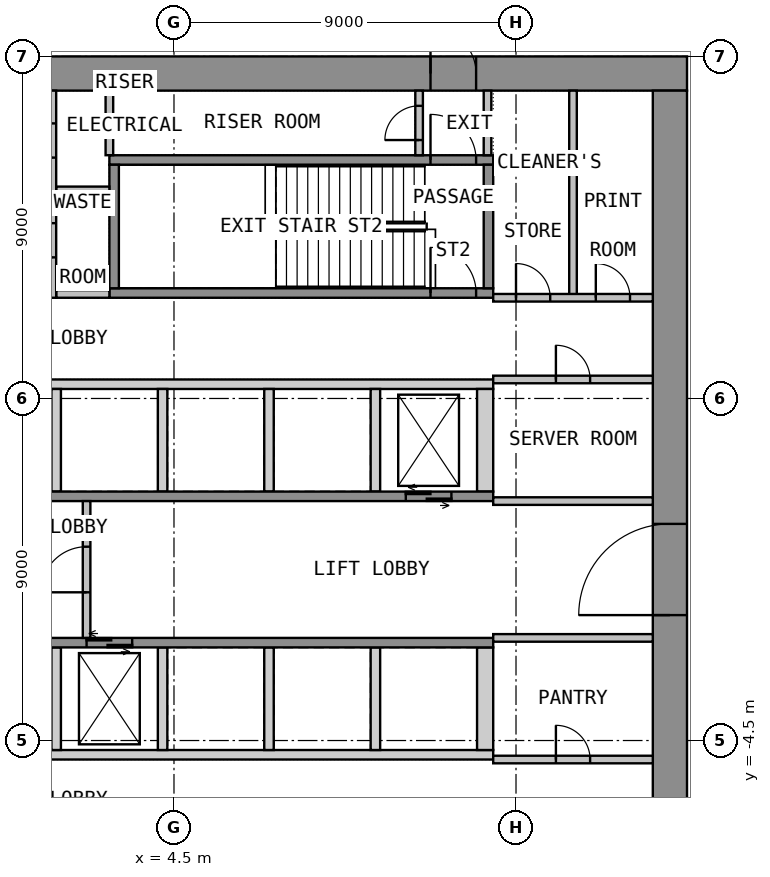
"""IFC4 building model, lengths in metres.
Left out: names, types, materials, properties, quantities, classifications, styles, units other than length and angle.
Written with IfcOpenShell. Run it as: python <this file> out.ifc"""

import sys

from ifc_helpers import new_model, si_unit, direction, frame, frame_2d, origin, place, context, subcontext, project, spatial, polyline, rectangle, outline, extrude, element, fill, save


model = new_model("IFC4")
c1 = context("Model", 3, precision=1e-05, world=origin(), true_north=direction((0.0, 1.0)))
c2 = subcontext(c1, "Body", "Model", "MODEL_VIEW")
j1 = project(units=[si_unit("LENGTHUNIT", "METRE"), si_unit("PLANEANGLEUNIT", "RADIAN")], contexts=[c1])
p1 = place(None, origin())
s1 = spatial("IfcSite", under=j1, at=p1, CompositionType="ELEMENT")
p2 = place(p1, origin())
s2 = spatial("IfcBuilding", under=s1, at=p2, CompositionType="ELEMENT")
p3 = place(p2, frame((0.0, 0.0, -5.0)))
s3 = spatial("IfcBuildingStorey", under=s2, at=p3, CompositionType="ELEMENT", Elevation=-5.0)
p4 = place(p3, frame((-18.0, 13.05, 0.0), z_axis=(0.0, 0.0, 1.0), x_axis=(1.0, 0.0, 0.0)))
e1 = element("IfcWall", 1, at=p4, inside=s3, PredefinedType="SHEAR", context=c2, shape_type="SweptSolid", body=[
    extrude(rectangle(XDim=36.0, YDim=0.9, at=frame_2d((18.0, 0.0))), origin(), (0.0, 0.0, 1.0), 4.55),
])
p5 = place(p4, frame((16.8, 0.0, 0.0)))
e2 = element("IfcOpeningElement", 2, at=p5, cuts=e1, PredefinedType="OPENING", context=c2, shape_type="SweptSolid", body=[
    extrude(rectangle(XDim=2.4, YDim=2.1, at=frame_2d((1.2, 1.05))), frame((0.0, 0.46, 0.0), z_axis=(0.0, -1.0, 0.0), x_axis=(1.0, 0.0, 0.0)), (0.0, 0.0, 1.0), 0.92),
])
p6 = place(p4, frame((5.55, 0.0, 0.0)))
e3 = element("IfcOpeningElement", 3, at=p6, cuts=e1, PredefinedType="OPENING", context=c2, shape_type="SweptSolid", body=[
    extrude(rectangle(XDim=1.2, YDim=2.1, at=frame_2d((0.6, 1.05))), frame((0.0, 0.46, 0.0), z_axis=(0.0, -1.0, 0.0), x_axis=(1.0, 0.0, 0.0)), (0.0, 0.0, 1.0), 0.92),
])
p7 = place(p4, frame((29.25, 0.0, 0.0)))
e4 = element("IfcOpeningElement", 4, at=p7, cuts=e1, PredefinedType="OPENING", context=c2, shape_type="SweptSolid", body=[
    extrude(rectangle(XDim=1.2, YDim=2.1, at=frame_2d((0.6, 1.05))), frame((0.0, 0.46, 0.0), z_axis=(0.0, -1.0, 0.0), x_axis=(1.0, 0.0, 0.0)), (0.0, 0.0, 1.0), 0.92),
])
p8 = place(p3, frame((17.55, -12.6, 0.0), z_axis=(0.0, 0.0, 1.0), x_axis=(0.0, 1.0, 0.0)))
e5 = element("IfcWall", 5, at=p8, inside=s3, PredefinedType="SHEAR", context=c2, shape_type="SweptSolid", body=[
    extrude(rectangle(XDim=25.2, YDim=0.9, at=frame_2d((12.6, 0.0))), origin(), (0.0, 0.0, 1.0), 4.55),
])
p9 = place(p8, frame((11.4, 0.0, 0.0)))
e6 = element("IfcOpeningElement", 6, at=p9, cuts=e5, PredefinedType="OPENING", context=c2, shape_type="SweptSolid", body=[
    extrude(rectangle(XDim=2.4, YDim=2.1, at=frame_2d((1.2, 1.05))), frame((0.0, 0.46, 0.0), z_axis=(0.0, -1.0, 0.0), x_axis=(1.0, 0.0, 0.0)), (0.0, 0.0, 1.0), 0.92),
])
p10 = place(p3, origin())
e7 = element("IfcWall", 7, at=p10, inside=s3, PredefinedType="SHEAR", context=c2, shape_type="SweptSolid", body=[
    extrude(outline(polyline([(-12.9, 4.75), (12.9, 4.75), (12.9, 5.0), (-12.9, 5.0), (-12.9, 4.75)])), origin(), (0.0, 0.0, 1.0), 4.55),
])
p11 = place(p3, origin())
e8 = element("IfcWall", 8, at=p11, inside=s3, PredefinedType="SHEAR", context=c2, shape_type="SweptSolid", body=[
    extrude(outline(polyline([(1.275, 2.05), (1.525, 2.05), (1.525, 4.75), (1.275, 4.75), (1.275, 2.05)])), origin(), (0.0, 0.0, 1.0), 4.55),
])
p12 = place(p3, origin())
e9 = element("IfcWall", 9, at=p12, inside=s3, PredefinedType="SHEAR", context=c2, shape_type="SweptSolid", body=[
    extrude(outline(polyline([(4.075, 2.05), (4.325, 2.05), (4.325, 4.75), (4.075, 4.75), (4.075, 2.05)])), origin(), (0.0, 0.0, 1.0), 4.55),
])
p13 = place(p3, origin())
e10 = element("IfcWall", 10, at=p13, inside=s3, PredefinedType="SHEAR", context=c2, shape_type="SweptSolid", body=[
    extrude(outline(polyline([(6.875, 2.05), (7.125, 2.05), (7.125, 4.75), (6.875, 4.75), (6.875, 2.05)])), origin(), (0.0, 0.0, 1.0), 4.55),
])
p14 = place(p3, origin())
e11 = element("IfcWall", 11, at=p14, inside=s3, PredefinedType="SHEAR", context=c2, shape_type="SweptSolid", body=[
    extrude(outline(polyline([(9.675, 2.05), (9.925, 2.05), (9.925, 4.75), (9.675, 4.75), (9.675, 2.05)])), origin(), (0.0, 0.0, 1.0), 4.55),
])
p15 = place(p3, origin())
e12 = element("IfcWall", 12, at=p15, inside=s3, PredefinedType="SHEAR", context=c2, shape_type="SweptSolid", body=[
    extrude(outline(polyline([(12.475, 2.05), (12.9, 2.05), (12.9, 4.75), (12.475, 4.75), (12.475, 2.05)])), origin(), (0.0, 0.0, 1.0), 4.55),
])
p16 = place(p3, frame((-12.9, 1.925, 0.0), z_axis=(0.0, 0.0, 1.0), x_axis=(1.0, 0.0, 0.0)))
e13 = element("IfcWall", 13, at=p16, inside=s3, PredefinedType="SHEAR", context=c2, shape_type="SweptSolid", body=[
    extrude(rectangle(XDim=25.8, YDim=0.25, at=frame_2d((12.9, 0.0))), origin(), (0.0, 0.0, 1.0), 4.55),
])
p17 = place(p16, frame((12.3, 0.0, 0.0)))
e14 = element("IfcOpeningElement", 14, at=p17, cuts=e13, PredefinedType="OPENING", context=c2, shape_type="SweptSolid", body=[
    extrude(rectangle(XDim=1.2, YDim=2.1, at=frame_2d((0.6, 1.05))), frame((0.0, 0.135, 0.0), z_axis=(0.0, -1.0, 0.0), x_axis=(1.0, 0.0, 0.0)), (0.0, 0.0, 1.0), 0.27),
])
p18 = place(p16, frame((23.5, 0.0, 0.0)))
e15 = element("IfcOpeningElement", 15, at=p18, cuts=e13, PredefinedType="OPENING", context=c2, shape_type="SweptSolid", body=[
    extrude(rectangle(XDim=1.2, YDim=2.1, at=frame_2d((0.6, 1.05))), frame((0.0, 0.135, 0.0), z_axis=(0.0, -1.0, 0.0), x_axis=(1.0, 0.0, 0.0)), (0.0, 0.0, 1.0), 0.27),
])
p19 = place(p3, origin())
e16 = element("IfcWall", 16, at=p19, inside=s3, PredefinedType="SHEAR", context=c2, shape_type="SweptSolid", body=[
    extrude(outline(polyline([(-12.9, -5.0), (12.9, -5.0), (12.9, -4.75), (-12.9, -4.75), (-12.9, -5.0)])), origin(), (0.0, 0.0, 1.0), 4.55),
])
p20 = place(p3, origin())
e17 = element("IfcWall", 17, at=p20, inside=s3, PredefinedType="SHEAR", context=c2, shape_type="SweptSolid", body=[
    extrude(outline(polyline([(1.275, -4.75), (1.525, -4.75), (1.525, -2.05), (1.275, -2.05), (1.275, -4.75)])), origin(), (0.0, 0.0, 1.0), 4.55),
])
p21 = place(p3, origin())
e18 = element("IfcWall", 18, at=p21, inside=s3, PredefinedType="SHEAR", context=c2, shape_type="SweptSolid", body=[
    extrude(outline(polyline([(4.075, -4.75), (4.325, -4.75), (4.325, -2.05), (4.075, -2.05), (4.075, -4.75)])), origin(), (0.0, 0.0, 1.0), 4.55),
])
p22 = place(p3, origin())
e19 = element("IfcWall", 19, at=p22, inside=s3, PredefinedType="SHEAR", context=c2, shape_type="SweptSolid", body=[
    extrude(outline(polyline([(6.875, -4.75), (7.125, -4.75), (7.125, -2.05), (6.875, -2.05), (6.875, -4.75)])), origin(), (0.0, 0.0, 1.0), 4.55),
])
p23 = place(p3, origin())
e20 = element("IfcWall", 20, at=p23, inside=s3, PredefinedType="SHEAR", context=c2, shape_type="SweptSolid", body=[
    extrude(outline(polyline([(9.675, -4.75), (9.925, -4.75), (9.925, -2.05), (9.675, -2.05), (9.675, -4.75)])), origin(), (0.0, 0.0, 1.0), 4.55),
])
p24 = place(p3, origin())
e21 = element("IfcWall", 21, at=p24, inside=s3, PredefinedType="SHEAR", context=c2, shape_type="SweptSolid", body=[
    extrude(outline(polyline([(12.475, -4.75), (12.9, -4.75), (12.9, -2.05), (12.475, -2.05), (12.475, -4.75)])), origin(), (0.0, 0.0, 1.0), 4.55),
])
p25 = place(p3, frame((-12.9, -1.925, 0.0), z_axis=(0.0, 0.0, 1.0), x_axis=(1.0, 0.0, 0.0)))
e22 = element("IfcWall", 22, at=p25, inside=s3, PredefinedType="SHEAR", context=c2, shape_type="SweptSolid", body=[
    extrude(rectangle(XDim=25.8, YDim=0.25, at=frame_2d((12.9, 0.0))), origin(), (0.0, 0.0, 1.0), 4.55),
])
p26 = place(p25, frame((12.3, 0.0, 0.0)))
e23 = element("IfcOpeningElement", 23, at=p26, cuts=e22, PredefinedType="OPENING", context=c2, shape_type="SweptSolid", body=[
    extrude(rectangle(XDim=1.2, YDim=2.1, at=frame_2d((0.6, 1.05))), frame((0.0, 0.135, 0.0), z_axis=(0.0, -1.0, 0.0), x_axis=(1.0, 0.0, 0.0)), (0.0, 0.0, 1.0), 0.27),
])
p27 = place(p25, frame((15.1, 0.0, 0.0)))
e24 = element("IfcOpeningElement", 24, at=p27, cuts=e22, PredefinedType="OPENING", context=c2, shape_type="SweptSolid", body=[
    extrude(rectangle(XDim=1.2, YDim=2.1, at=frame_2d((0.6, 1.05))), frame((0.0, 0.135, 0.0), z_axis=(0.0, -1.0, 0.0), x_axis=(1.0, 0.0, 0.0)), (0.0, 0.0, 1.0), 0.27),
])
p28 = place(p3, frame((2.2, -1.8, 0.0), z_axis=(0.0, 0.0, 1.0), x_axis=(0.0, 1.0, 0.0)))
e25 = element("IfcWall", 25, at=p28, inside=s3, PredefinedType="PARTITIONING", context=c2, shape_type="SweptSolid", body=[
    extrude(rectangle(XDim=3.6, YDim=0.2, at=frame_2d((1.8, 0.0))), origin(), (0.0, 0.0, 1.0), 4.55),
])
p29 = place(p28, frame((1.2, 0.0, 0.0)))
e26 = element("IfcOpeningElement", 26, at=p29, cuts=e25, PredefinedType="OPENING", context=c2, shape_type="SweptSolid", body=[
    extrude(rectangle(XDim=1.2, YDim=2.1, at=frame_2d((0.6, 1.05))), frame((0.0, 0.11, 0.0), z_axis=(0.0, -1.0, 0.0), x_axis=(1.0, 0.0, 0.0)), (0.0, 0.0, 1.0), 0.22),
])
p30 = place(p3, frame((2.8, 7.275, 0.0), z_axis=(0.0, 0.0, 1.0), x_axis=(1.0, 0.0, 0.0)))
e27 = element("IfcWall", 27, at=p30, inside=s3, PredefinedType="SHEAR", context=c2, shape_type="SweptSolid", body=[
    extrude(rectangle(XDim=10.1, YDim=0.25, at=frame_2d((5.05, 0.0))), origin(), (0.0, 0.0, 1.0), 4.55),
])
p31 = place(p30, frame((8.45, 0.0, 0.0)))
e28 = element("IfcOpeningElement", 28, at=p31, cuts=e27, PredefinedType="OPENING", context=c2, shape_type="SweptSolid", body=[
    extrude(rectangle(XDim=1.2, YDim=2.1, at=frame_2d((0.6, 1.05))), frame((0.0, 0.135, 0.0), z_axis=(0.0, -1.0, 0.0), x_axis=(1.0, 0.0, 0.0)), (0.0, 0.0, 1.0), 0.27),
])
p32 = place(p3, frame((2.8, 10.775, 0.0), z_axis=(0.0, 0.0, 1.0), x_axis=(1.0, 0.0, 0.0)))
e29 = element("IfcWall", 29, at=p32, inside=s3, PredefinedType="SHEAR", context=c2, shape_type="SweptSolid", body=[
    extrude(rectangle(XDim=10.1, YDim=0.25, at=frame_2d((5.05, 0.0))), origin(), (0.0, 0.0, 1.0), 4.55),
])
p33 = place(p32, frame((8.45, 0.0, 0.0)))
e30 = element("IfcOpeningElement", 30, at=p33, cuts=e29, PredefinedType="OPENING", context=c2, shape_type="SweptSolid", body=[
    extrude(rectangle(XDim=1.2, YDim=2.1, at=frame_2d((0.6, 1.05))), frame((0.0, 0.135, 0.0), z_axis=(0.0, -1.0, 0.0), x_axis=(1.0, 0.0, 0.0)), (0.0, 0.0, 1.0), 0.27),
])
for number, where, z_axis, x_axis in (
    (31, (2.925, 7.4, 0.0), (0.0, 0.0, 1.0), (0.0, 1.0, 0.0)),
    (32, (12.775, 7.4, 0.0), (0.0, 0.0, 1.0), (0.0, 1.0, 0.0)),
):
    element("IfcWall", number, at=place(p3, frame(where, z_axis=z_axis, x_axis=x_axis)), inside=s3, PredefinedType="SHEAR", context=c2, shape_type="SweptSolid", body=[
        extrude(rectangle(XDim=3.25, YDim=0.25, at=frame_2d((1.625, 0.0))), origin(), (0.0, 0.0, 1.0), 4.55),
    ])
for number, where, z_axis, x_axis in (
    (33, (1.4, 7.25, 0.0), (0.0, 0.0, 1.0), (1.0, 0.0, 0.0)),
    (34, (1.4, 9.975, 0.0), (0.0, 0.0, 1.0), (1.0, 0.0, 0.0)),
):
    element("IfcWall", number, at=place(p3, frame(where, z_axis=z_axis, x_axis=x_axis)), inside=s3, PredefinedType="PARTITIONING", context=c2, shape_type="SweptSolid", body=[
        extrude(rectangle(XDim=1.4, YDim=0.2, at=frame_2d((0.7, 0.0))), origin(), (0.0, 0.0, 1.0), 4.55),
    ])
p34 = place(p3, frame((1.3, 7.15, 0.0), z_axis=(0.0, 0.0, 1.0), x_axis=(0.0, 1.0, 0.0)))
e35 = element("IfcWall", 35, at=p34, inside=s3, PredefinedType="PARTITIONING", context=c2, shape_type="SweptSolid", body=[
    extrude(rectangle(XDim=5.45, YDim=0.2, at=frame_2d((2.725, 0.0))), origin(), (0.0, 0.0, 1.0), 4.55),
])
p35 = place(p34, frame((1.062, 0.0, 0.0)))
e36 = element("IfcOpeningElement", 36, at=p35, cuts=e35, PredefinedType="OPENING", context=c2, shape_type="SweptSolid", body=[
    extrude(rectangle(XDim=0.9, YDim=2.1, at=frame_2d((0.45, 1.05))), frame((0.0, 0.11, 0.0), z_axis=(0.0, -1.0, 0.0), x_axis=(1.0, 0.0, 0.0)), (0.0, 0.0, 1.0), 0.22),
])
p36 = place(p34, frame((3.688, 0.0, 0.0)))
e37 = element("IfcOpeningElement", 37, at=p36, cuts=e35, PredefinedType="OPENING", context=c2, shape_type="SweptSolid", body=[
    extrude(rectangle(XDim=0.9, YDim=2.1, at=frame_2d((0.45, 1.05))), frame((0.0, 0.11, 0.0), z_axis=(0.0, -1.0, 0.0), x_axis=(1.0, 0.0, 0.0)), (0.0, 0.0, 1.0), 0.22),
])
p37 = place(p3, frame((12.75, 10.9, 0.0), z_axis=(0.0, 0.0, 1.0), x_axis=(0.0, 1.0, 0.0)))
e38 = element("IfcWall", 38, at=p37, inside=s3, PredefinedType="PARTITIONING", context=c2, shape_type="SweptSolid", body=[
    extrude(rectangle(XDim=1.7, YDim=0.2, at=frame_2d((0.85, 0.0))), origin(), (0.0, 0.0, 1.0), 4.55),
])
p38 = place(p3, frame((10.95, 10.9, 0.0), z_axis=(0.0, 0.0, 1.0), x_axis=(0.0, 1.0, 0.0)))
e39 = element("IfcWall", 39, at=p38, inside=s3, PredefinedType="PARTITIONING", context=c2, shape_type="SweptSolid", body=[
    extrude(rectangle(XDim=1.7, YDim=0.2, at=frame_2d((0.85, 0.0))), origin(), (0.0, 0.0, 1.0), 4.55),
])
p39 = place(p38, frame((0.4, 0.0, 0.0)))
e40 = element("IfcOpeningElement", 40, at=p39, cuts=e39, PredefinedType="OPENING", context=c2, shape_type="SweptSolid", body=[
    extrude(rectangle(XDim=0.9, YDim=2.1, at=frame_2d((0.45, 1.05))), frame((0.0, 0.11, 0.0), z_axis=(0.0, -1.0, 0.0), x_axis=(1.0, 0.0, 0.0)), (0.0, 0.0, 1.0), 0.22),
])
p40 = place(p3, frame((15.0, 7.15, 0.0), z_axis=(0.0, 0.0, 1.0), x_axis=(0.0, 1.0, 0.0)))
e41 = element("IfcWall", 41, at=p40, inside=s3, PredefinedType="PARTITIONING", context=c2, shape_type="SweptSolid", body=[
    extrude(rectangle(XDim=5.45, YDim=0.2, at=frame_2d((2.725, 0.0))), origin(), (0.0, 0.0, 1.0), 4.55),
])
p41 = place(p3, frame((12.9, 7.15, 0.0), z_axis=(0.0, 0.0, 1.0), x_axis=(1.0, 0.0, 0.0)))
e42 = element("IfcWall", 42, at=p41, inside=s3, PredefinedType="PARTITIONING", context=c2, shape_type="SweptSolid", body=[
    extrude(rectangle(XDim=4.2, YDim=0.2, at=frame_2d((2.1, 0.0))), origin(), (0.0, 0.0, 1.0), 4.55),
])
p42 = place(p41, frame((0.6, 0.0, 0.0)))
e43 = element("IfcOpeningElement", 43, at=p42, cuts=e42, PredefinedType="OPENING", context=c2, shape_type="SweptSolid", body=[
    extrude(rectangle(XDim=0.9, YDim=2.1, at=frame_2d((0.45, 1.05))), frame((0.0, 0.11, 0.0), z_axis=(0.0, -1.0, 0.0), x_axis=(1.0, 0.0, 0.0)), (0.0, 0.0, 1.0), 0.22),
])
p43 = place(p41, frame((2.7, 0.0, 0.0)))
e44 = element("IfcOpeningElement", 44, at=p43, cuts=e42, PredefinedType="OPENING", context=c2, shape_type="SweptSolid", body=[
    extrude(rectangle(XDim=0.9, YDim=2.1, at=frame_2d((0.45, 1.05))), frame((0.0, 0.11, 0.0), z_axis=(0.0, -1.0, 0.0), x_axis=(1.0, 0.0, 0.0)), (0.0, 0.0, 1.0), 0.22),
])
p44 = place(p3, frame((12.9, 5.0, 0.0), z_axis=(0.0, 0.0, 1.0), x_axis=(1.0, 0.0, 0.0)))
e45 = element("IfcWall", 45, at=p44, inside=s3, PredefinedType="PARTITIONING", context=c2, shape_type="SweptSolid", body=[
    extrude(rectangle(XDim=4.2, YDim=0.2, at=frame_2d((2.1, 0.0))), origin(), (0.0, 0.0, 1.0), 4.55),
])
p45 = place(p44, frame((1.65, 0.0, 0.0)))
e46 = element("IfcOpeningElement", 46, at=p45, cuts=e45, PredefinedType="OPENING", context=c2, shape_type="SweptSolid", body=[
    extrude(rectangle(XDim=0.9, YDim=2.1, at=frame_2d((0.45, 1.05))), frame((0.0, 0.11, 0.0), z_axis=(0.0, -1.0, 0.0), x_axis=(1.0, 0.0, 0.0)), (0.0, 0.0, 1.0), 0.22),
])
p46 = place(p3, frame((12.9, 1.8, 0.0), z_axis=(0.0, 0.0, 1.0), x_axis=(1.0, 0.0, 0.0)))
e47 = element("IfcWall", 47, at=p46, inside=s3, PredefinedType="PARTITIONING", context=c2, shape_type="SweptSolid", body=[
    extrude(rectangle(XDim=4.2, YDim=0.2, at=frame_2d((2.1, 0.0))), origin(), (0.0, 0.0, 1.0), 4.55),
])
p47 = place(p3, frame((12.9, -5.0, 0.0), z_axis=(0.0, 0.0, 1.0), x_axis=(1.0, 0.0, 0.0)))
e48 = element("IfcWall", 48, at=p47, inside=s3, PredefinedType="PARTITIONING", context=c2, shape_type="SweptSolid", body=[
    extrude(rectangle(XDim=4.2, YDim=0.2, at=frame_2d((2.1, 0.0))), origin(), (0.0, 0.0, 1.0), 4.55),
])
p48 = place(p47, frame((1.65, 0.0, 0.0)))
e49 = element("IfcOpeningElement", 49, at=p48, cuts=e48, PredefinedType="OPENING", context=c2, shape_type="SweptSolid", body=[
    extrude(rectangle(XDim=0.9, YDim=2.1, at=frame_2d((0.45, 1.05))), frame((0.0, 0.11, 0.0), z_axis=(0.0, -1.0, 0.0), x_axis=(1.0, 0.0, 0.0)), (0.0, 0.0, 1.0), 0.22),
])
p49 = place(p3, frame((12.9, -1.8, 0.0), z_axis=(0.0, 0.0, 1.0), x_axis=(1.0, 0.0, 0.0)))
e50 = element("IfcWall", 50, at=p49, inside=s3, PredefinedType="PARTITIONING", context=c2, shape_type="SweptSolid", body=[
    extrude(rectangle(XDim=4.2, YDim=0.2, at=frame_2d((2.1, 0.0))), origin(), (0.0, 0.0, 1.0), 4.55),
])
p50 = place(p3, frame((2.8, 10.901, 0.0), z_axis=(0.0, 0.0, 1.0), x_axis=(0.0, 1.0, 0.0)))
e51 = element("IfcWall", 51, at=p50, inside=s3, PredefinedType="PARTITIONING", context=c2, shape_type="SweptSolid", body=[
    extrude(rectangle(XDim=1.698, YDim=0.2, at=frame_2d((0.849, 0.0))), origin(), (0.0, 0.0, 1.0), 4.55),
])
p51 = place(p9, origin())
e52 = element("IfcDoor", 52, at=p51, inside=s3, OperationType="DOUBLE_DOOR_DOUBLE_SWING", PredefinedType="DOOR", context=c2, shape_type="SweptSolid", body=[
    extrude(rectangle(XDim=2.4, YDim=2.1, at=frame_2d((1.2, 1.05))), frame((0.0, 0.025, 0.0), z_axis=(0.0, -1.0, 0.0), x_axis=(1.0, 0.0, 0.0)), (0.0, 0.0, 1.0), 0.05),
])
fill(e6, e52)
p52 = place(p7, origin())
e53 = element("IfcDoor", 53, at=p52, inside=s3, OperationType="SINGLE_SWING_RIGHT", PredefinedType="DOOR", context=c2, shape_type="SweptSolid", body=[
    extrude(rectangle(XDim=1.2, YDim=2.1, at=frame_2d((0.6, 1.05))), frame((0.0, 0.025, 0.0), z_axis=(0.0, -1.0, 0.0), x_axis=(1.0, 0.0, 0.0)), (0.0, 0.0, 1.0), 0.05),
])
fill(e4, e53)
p53 = place(p18, origin())
e54 = element("IfcDoor", 54, at=p53, inside=s3, OperationType="DOUBLE_DOOR_SLIDING", PredefinedType="DOOR", context=c2, shape_type="SweptSolid", body=[
    extrude(rectangle(XDim=1.2, YDim=2.1, at=frame_2d((0.6, 1.05))), frame((0.0, 0.025, 0.0), z_axis=(0.0, -1.0, 0.0), x_axis=(1.0, 0.0, 0.0)), (0.0, 0.0, 1.0), 0.05),
])
fill(e15, e54)
p54 = place(p27, origin())
e55 = element("IfcDoor", 55, at=p54, inside=s3, OperationType="DOUBLE_DOOR_SLIDING", PredefinedType="DOOR", context=c2, shape_type="SweptSolid", body=[
    extrude(rectangle(XDim=1.2, YDim=2.1, at=frame_2d((0.6, 1.05))), frame((0.0, 0.025, 0.0), z_axis=(0.0, -1.0, 0.0), x_axis=(1.0, 0.0, 0.0)), (0.0, 0.0, 1.0), 0.05),
])
fill(e24, e55)
p55 = place(p29, origin())
e56 = element("IfcDoor", 56, at=p55, inside=s3, OperationType="SINGLE_SWING_LEFT", PredefinedType="DOOR", context=c2, shape_type="SweptSolid", body=[
    extrude(rectangle(XDim=1.2, YDim=2.1, at=frame_2d((0.6, 1.05))), frame((0.0, 0.025, 0.0), z_axis=(0.0, -1.0, 0.0), x_axis=(1.0, 0.0, 0.0)), (0.0, 0.0, 1.0), 0.05),
])
fill(e26, e56)
p56 = place(p31, origin())
e57 = element("IfcDoor", 57, at=p56, inside=s3, OperationType="SINGLE_SWING_LEFT", PredefinedType="DOOR", context=c2, shape_type="SweptSolid", body=[
    extrude(rectangle(XDim=1.2, YDim=2.1, at=frame_2d((0.6, 1.05))), frame((0.0, 0.025, 0.0), z_axis=(0.0, -1.0, 0.0), x_axis=(1.0, 0.0, 0.0)), (0.0, 0.0, 1.0), 0.05),
])
fill(e28, e57)
p57 = place(p35, origin())
e58 = element("IfcDoor", 58, at=p57, inside=s3, OperationType="SINGLE_SWING_LEFT", PredefinedType="DOOR", context=c2, shape_type="SweptSolid", body=[
    extrude(rectangle(XDim=0.9, YDim=2.1, at=frame_2d((0.45, 1.05))), frame((0.0, 0.025, 0.0), z_axis=(0.0, -1.0, 0.0), x_axis=(1.0, 0.0, 0.0)), (0.0, 0.0, 1.0), 0.05),
])
fill(e36, e58)
p58 = place(p36, origin())
e59 = element("IfcDoor", 59, at=p58, inside=s3, OperationType="SINGLE_SWING_LEFT", PredefinedType="DOOR", context=c2, shape_type="SweptSolid", body=[
    extrude(rectangle(XDim=0.9, YDim=2.1, at=frame_2d((0.45, 1.05))), frame((0.0, 0.025, 0.0), z_axis=(0.0, -1.0, 0.0), x_axis=(1.0, 0.0, 0.0)), (0.0, 0.0, 1.0), 0.05),
])
fill(e37, e59)
p59 = place(p33, origin())
e60 = element("IfcDoor", 60, at=p59, inside=s3, OperationType="SINGLE_SWING_RIGHT", PredefinedType="DOOR", context=c2, shape_type="SweptSolid", body=[
    extrude(rectangle(XDim=1.2, YDim=2.1, at=frame_2d((0.6, 1.05))), frame((0.0, 0.025, 0.0), z_axis=(0.0, -1.0, 0.0), x_axis=(1.0, 0.0, 0.0)), (0.0, 0.0, 1.0), 0.05),
])
fill(e30, e60)
p60 = place(p39, origin())
e61 = element("IfcDoor", 61, at=p60, inside=s3, OperationType="SINGLE_SWING_LEFT", PredefinedType="DOOR", context=c2, shape_type="SweptSolid", body=[
    extrude(rectangle(XDim=0.9, YDim=2.1, at=frame_2d((0.45, 1.05))), frame((0.0, 0.025, 0.0), z_axis=(0.0, -1.0, 0.0), x_axis=(1.0, 0.0, 0.0)), (0.0, 0.0, 1.0), 0.05),
])
fill(e40, e61)
p61 = place(p42, origin())
e62 = element("IfcDoor", 62, at=p61, inside=s3, OperationType="SINGLE_SWING_LEFT", PredefinedType="DOOR", context=c2, shape_type="SweptSolid", body=[
    extrude(rectangle(XDim=0.9, YDim=2.1, at=frame_2d((0.45, 1.05))), frame((0.0, 0.025, 0.0), z_axis=(0.0, -1.0, 0.0), x_axis=(1.0, 0.0, 0.0)), (0.0, 0.0, 1.0), 0.05),
])
fill(e43, e62)
p62 = place(p43, origin())
e63 = element("IfcDoor", 63, at=p62, inside=s3, OperationType="SINGLE_SWING_LEFT", PredefinedType="DOOR", context=c2, shape_type="SweptSolid", body=[
    extrude(rectangle(XDim=0.9, YDim=2.1, at=frame_2d((0.45, 1.05))), frame((0.0, 0.025, 0.0), z_axis=(0.0, -1.0, 0.0), x_axis=(1.0, 0.0, 0.0)), (0.0, 0.0, 1.0), 0.05),
])
fill(e44, e63)
p63 = place(p45, origin())
e64 = element("IfcDoor", 64, at=p63, inside=s3, OperationType="SINGLE_SWING_LEFT", PredefinedType="DOOR", context=c2, shape_type="SweptSolid", body=[
    extrude(rectangle(XDim=0.9, YDim=2.1, at=frame_2d((0.45, 1.05))), frame((0.0, 0.025, 0.0), z_axis=(0.0, -1.0, 0.0), x_axis=(1.0, 0.0, 0.0)), (0.0, 0.0, 1.0), 0.05),
])
fill(e46, e64)
p64 = place(p48, origin())
e65 = element("IfcDoor", 65, at=p64, inside=s3, OperationType="SINGLE_SWING_LEFT", PredefinedType="DOOR", context=c2, shape_type="SweptSolid", body=[
    extrude(rectangle(XDim=0.9, YDim=2.1, at=frame_2d((0.45, 1.05))), frame((0.0, 0.025, 0.0), z_axis=(0.0, -1.0, 0.0), x_axis=(1.0, 0.0, 0.0)), (0.0, 0.0, 1.0), 0.05),
])
fill(e49, e65)
save(model, sys.argv[1])
